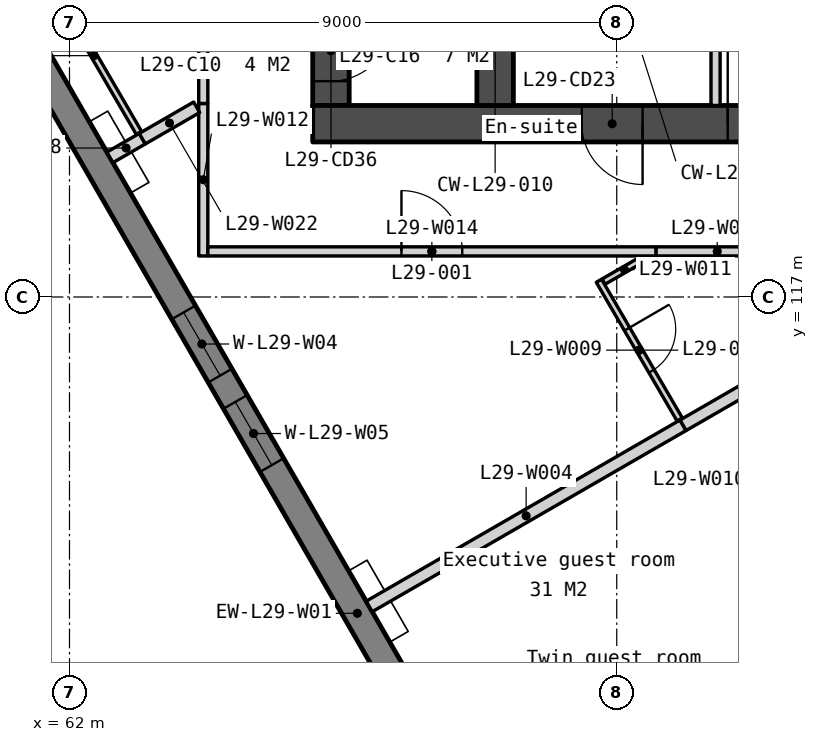
"""IFC4 building model, lengths in metres.
Left out: names, types, materials, properties, quantities, classifications, styles, units other than length and angle.
Written with IfcOpenShell. Run it as: python <this file> out.ifc"""

import sys

from ifc_helpers import new_model, si_unit, direction, frame, frame_2d, origin, place, context, subcontext, project, spatial, polyline, rectangle, outline, extrude, element, fill, save


model = new_model("IFC4")
c1 = context("Model", 3, precision=1e-05, world=origin(), true_north=direction((0.0, 1.0)))
c2 = subcontext(c1, "Body", "Model", "MODEL_VIEW")
j1 = project(units=[si_unit("LENGTHUNIT", "METRE"), si_unit("PLANEANGLEUNIT", "RADIAN")], contexts=[c1])
p1 = place(None, origin())
s1 = spatial("IfcSite", under=j1, at=p1, CompositionType="ELEMENT")
p2 = place(p1, origin())
s2 = spatial("IfcBuilding", under=s1, at=p2, CompositionType="ELEMENT")
p3 = place(p2, frame((0.0, 0.0, 116.8)))
s3 = spatial("IfcBuildingStorey", under=s2, at=p3, CompositionType="ELEMENT", Elevation=116.8)
p4 = place(p3, frame((66.3, 133.95, 0.0), z_axis=(0.0, 0.0, 1.0), x_axis=(0.0, -1.0, 0.0)))
e1 = element("IfcWall", 1, at=p4, inside=s3, PredefinedType="SOLIDWALL", context=c2, shape_type="SweptSolid", body=[
    extrude(rectangle(XDim=13.8, YDim=0.6, at=frame_2d((6.9, 0.0))), origin(), (0.0, 0.0, 1.0), 3.35),
])
p5 = place(p4, frame((0.6, 0.0, 0.0)))
e2 = element("IfcOpeningElement", 2, at=p5, cuts=e1, PredefinedType="OPENING", context=c2, shape_type="SweptSolid", body=[
    extrude(rectangle(XDim=1.1, YDim=2.1, at=frame_2d((0.55, 1.05))), frame((0.0, 0.31, 0.0), z_axis=(0.0, -1.0, 0.0), x_axis=(1.0, 0.0, 0.0)), (0.0, 0.0, 1.0), 0.62),
])
p6 = place(p4, frame((8.405, 0.0, 0.0)))
e3 = element("IfcOpeningElement", 3, at=p6, cuts=e1, PredefinedType="OPENING", context=c2, shape_type="SweptSolid", body=[
    extrude(rectangle(XDim=1.0, YDim=2.1, at=frame_2d((0.5, 1.05))), frame((0.0, 0.31, 0.0), z_axis=(0.0, -1.0, 0.0), x_axis=(1.0, 0.0, 0.0)), (0.0, 0.0, 1.0), 0.62),
])
p7 = place(p4, frame((10.355, 0.0, 0.0)))
e4 = element("IfcOpeningElement", 4, at=p7, cuts=e1, PredefinedType="OPENING", context=c2, shape_type="SweptSolid", body=[
    extrude(rectangle(XDim=1.0, YDim=2.1, at=frame_2d((0.5, 1.05))), frame((0.0, 0.31, 0.0), z_axis=(0.0, -1.0, 0.0), x_axis=(1.0, 0.0, 0.0)), (0.0, 0.0, 1.0), 0.62),
])
p8 = place(p4, frame((12.4, 0.0, 0.0)))
e5 = element("IfcOpeningElement", 5, at=p8, cuts=e1, PredefinedType="OPENING", context=c2, shape_type="SweptSolid", body=[
    extrude(rectangle(XDim=1.0, YDim=2.1, at=frame_2d((0.5, 1.05))), frame((0.0, 0.31, 0.0), z_axis=(0.0, -1.0, 0.0), x_axis=(1.0, 0.0, 0.0)), (0.0, 0.0, 1.0), 0.62),
])
p9 = place(p3, frame((66.0, 119.85, 0.0), z_axis=(0.0, 0.0, 1.0), x_axis=(1.0, 0.0, 0.0)))
e6 = element("IfcWall", 6, at=p9, inside=s3, PredefinedType="SOLIDWALL", context=c2, shape_type="SweptSolid", body=[
    extrude(rectangle(XDim=28.0, YDim=0.6, at=frame_2d((14.0, 0.0))), origin(), (0.0, 0.0, 1.0), 3.35),
])
p10 = place(p9, frame((6.825, 0.0, 0.0)))
e7 = element("IfcOpeningElement", 7, at=p10, cuts=e6, PredefinedType="OPENING", context=c2, shape_type="SweptSolid", body=[
    extrude(rectangle(XDim=1.8, YDim=2.1, at=frame_2d((0.9, 1.05))), frame((0.0, 0.31, 0.0), z_axis=(0.0, -1.0, 0.0), x_axis=(1.0, 0.0, 0.0)), (0.0, 0.0, 1.0), 0.62),
])
p11 = place(p9, frame((15.85, 0.0, 0.0)))
e8 = element("IfcOpeningElement", 8, at=p11, cuts=e6, PredefinedType="OPENING", context=c2, shape_type="SweptSolid", body=[
    extrude(rectangle(XDim=1.5, YDim=2.1, at=frame_2d((0.75, 1.05))), frame((0.0, 0.31, 0.0), z_axis=(0.0, -1.0, 0.0), x_axis=(1.0, 0.0, 0.0)), (0.0, 0.0, 1.0), 0.62),
])
p12 = place(p9, frame((19.375, 0.0, 0.0)))
e9 = element("IfcOpeningElement", 9, at=p12, cuts=e6, PredefinedType="OPENING", context=c2, shape_type="SweptSolid", body=[
    extrude(rectangle(XDim=1.8, YDim=2.1, at=frame_2d((0.9, 1.05))), frame((0.0, 0.31, 0.0), z_axis=(0.0, -1.0, 0.0), x_axis=(1.0, 0.0, 0.0)), (0.0, 0.0, 1.0), 0.62),
])
p13 = place(p9, frame((4.425, 0.0, 0.0)))
e10 = element("IfcOpeningElement", 10, at=p13, cuts=e6, PredefinedType="OPENING", context=c2, shape_type="SweptSolid", body=[
    extrude(rectangle(XDim=1.0, YDim=2.1, at=frame_2d((0.5, 1.05))), frame((0.0, 0.31, 0.0), z_axis=(0.0, -1.0, 0.0), x_axis=(1.0, 0.0, 0.0)), (0.0, 0.0, 1.0), 0.62),
])
p14 = place(p9, frame((9.783, 0.0, 0.0)))
e11 = element("IfcOpeningElement", 11, at=p14, cuts=e6, PredefinedType="OPENING", context=c2, shape_type="SweptSolid", body=[
    extrude(rectangle(XDim=1.0, YDim=2.1, at=frame_2d((0.5, 1.05))), frame((0.0, 0.31, 0.0), z_axis=(0.0, -1.0, 0.0), x_axis=(1.0, 0.0, 0.0)), (0.0, 0.0, 1.0), 0.62),
])
p15 = place(p9, frame((11.525, 0.0, 0.0)))
e12 = element("IfcOpeningElement", 12, at=p15, cuts=e6, PredefinedType="OPENING", context=c2, shape_type="SweptSolid", body=[
    extrude(rectangle(XDim=1.0, YDim=2.1, at=frame_2d((0.5, 1.05))), frame((0.0, 0.31, 0.0), z_axis=(0.0, -1.0, 0.0), x_axis=(1.0, 0.0, 0.0)), (0.0, 0.0, 1.0), 0.62),
])
p16 = place(p9, frame((13.658, 0.0, 0.0)))
e13 = element("IfcOpeningElement", 13, at=p16, cuts=e6, PredefinedType="OPENING", context=c2, shape_type="SweptSolid", body=[
    extrude(rectangle(XDim=1.0, YDim=2.1, at=frame_2d((0.5, 1.05))), frame((0.0, 0.31, 0.0), z_axis=(0.0, -1.0, 0.0), x_axis=(1.0, 0.0, 0.0)), (0.0, 0.0, 1.0), 0.62),
])
p17 = place(p9, frame((21.725, 0.0, 0.0)))
e14 = element("IfcOpeningElement", 14, at=p17, cuts=e6, PredefinedType="OPENING", context=c2, shape_type="SweptSolid", body=[
    extrude(rectangle(XDim=1.0, YDim=2.1, at=frame_2d((0.5, 1.05))), frame((0.0, 0.31, 0.0), z_axis=(0.0, -1.0, 0.0), x_axis=(1.0, 0.0, 0.0)), (0.0, 0.0, 1.0), 0.62),
])
p18 = place(p9, frame((23.425, 0.0, 0.0)))
e15 = element("IfcOpeningElement", 15, at=p18, cuts=e6, PredefinedType="OPENING", context=c2, shape_type="SweptSolid", body=[
    extrude(rectangle(XDim=1.0, YDim=2.1, at=frame_2d((0.5, 1.05))), frame((0.0, 0.31, 0.0), z_axis=(0.0, -1.0, 0.0), x_axis=(1.0, 0.0, 0.0)), (0.0, 0.0, 1.0), 0.62),
])
p19 = place(p3, frame((69.0, 122.25, 0.0), z_axis=(0.0, 0.0, 1.0), x_axis=(0.0, -1.0, 0.0)))
e16 = element("IfcWall", 16, at=p19, inside=s3, PredefinedType="SOLIDWALL", context=c2, shape_type="SweptSolid", body=[
    extrude(rectangle(XDim=2.1, YDim=0.6, at=frame_2d((1.05, 0.0))), origin(), (0.0, 0.0, 1.0), 3.35),
])
p20 = place(p3, frame((72.625, 122.25, 0.0), z_axis=(0.0, 0.0, 1.0), x_axis=(0.0, -1.0, 0.0)))
e17 = element("IfcWall", 17, at=p20, inside=s3, PredefinedType="PARTITIONING", context=c2, shape_type="SweptSolid", body=[
    extrude(rectangle(XDim=2.1, YDim=0.15, at=frame_2d((1.05, 0.0))), origin(), (0.0, 0.0, 1.0), 3.35),
])
p21 = place(p3, frame((56.073, 130.263, -0.15), z_axis=(0.0, 0.0, 1.0), x_axis=(0.500000478905, -0.866025127289, 0.0)))
e18 = element("IfcWall", 18, at=p21, inside=s3, PredefinedType="SOLIDWALL", context=c2, shape_type="SweptSolid", body=[
    extrude(outline(polyline([(42.643, 0.0), (42.643, 3.5), (0.0, 3.5), (0.0, 0.0), (42.643, 0.0)])), frame((0.0, 0.225, 0.0), z_axis=(0.0, -1.0, 0.0), x_axis=(1.0, 0.0, 0.0)), (0.0, 0.0, 1.0), 0.45),
])
p22 = place(p21, frame((0.72, 0.0, 1.05)))
e19 = element("IfcOpeningElement", 19, at=p22, cuts=e18, PredefinedType="OPENING", context=c2, shape_type="SweptSolid", body=[
    extrude(rectangle(XDim=1.2, YDim=1.5, at=frame_2d((0.6, 0.75))), frame((0.0, 0.235, 0.0), z_axis=(0.0, -1.0, 0.0), x_axis=(1.0, 0.0, 0.0)), (0.0, 0.0, 1.0), 0.47),
])
p23 = place(p21, frame((7.079, 0.0, 1.05)))
e20 = element("IfcOpeningElement", 20, at=p23, cuts=e18, PredefinedType="OPENING", context=c2, shape_type="SweptSolid", body=[
    extrude(rectangle(XDim=1.2, YDim=1.5, at=frame_2d((0.6, 0.75))), frame((0.0, 0.235, 0.0), z_axis=(0.0, -1.0, 0.0), x_axis=(1.0, 0.0, 0.0)), (0.0, 0.0, 1.0), 0.47),
])
p24 = place(p21, frame((8.779, 0.0, 1.05)))
e21 = element("IfcOpeningElement", 21, at=p24, cuts=e18, PredefinedType="OPENING", context=c2, shape_type="SweptSolid", body=[
    extrude(rectangle(XDim=1.2, YDim=1.5, at=frame_2d((0.6, 0.75))), frame((0.0, 0.235, 0.0), z_axis=(0.0, -1.0, 0.0), x_axis=(1.0, 0.0, 0.0)), (0.0, 0.0, 1.0), 0.47),
])
p25 = place(p21, frame((15.607, 0.0, 1.05)))
e22 = element("IfcOpeningElement", 22, at=p25, cuts=e18, PredefinedType="OPENING", context=c2, shape_type="SweptSolid", body=[
    extrude(rectangle(XDim=1.2, YDim=1.5, at=frame_2d((0.6, 0.75))), frame((0.0, 0.235, 0.0), z_axis=(0.0, -1.0, 0.0), x_axis=(1.0, 0.0, 0.0)), (0.0, 0.0, 1.0), 0.47),
])
p26 = place(p21, frame((17.307, 0.0, 1.05)))
e23 = element("IfcOpeningElement", 23, at=p26, cuts=e18, PredefinedType="OPENING", context=c2, shape_type="SweptSolid", body=[
    extrude(rectangle(XDim=1.2, YDim=1.5, at=frame_2d((0.6, 0.75))), frame((0.0, 0.235, 0.0), z_axis=(0.0, -1.0, 0.0), x_axis=(1.0, 0.0, 0.0)), (0.0, 0.0, 1.0), 0.47),
])
p27 = place(p21, frame((24.136, 0.0, 1.05)))
e24 = element("IfcOpeningElement", 24, at=p27, cuts=e18, PredefinedType="OPENING", context=c2, shape_type="SweptSolid", body=[
    extrude(rectangle(XDim=1.2, YDim=1.5, at=frame_2d((0.6, 0.75))), frame((0.0, 0.235, 0.0), z_axis=(0.0, -1.0, 0.0), x_axis=(1.0, 0.0, 0.0)), (0.0, 0.0, 1.0), 0.47),
])
p28 = place(p21, frame((25.836, 0.0, 1.05)))
e25 = element("IfcOpeningElement", 25, at=p28, cuts=e18, PredefinedType="OPENING", context=c2, shape_type="SweptSolid", body=[
    extrude(rectangle(XDim=1.2, YDim=1.5, at=frame_2d((0.6, 0.75))), frame((0.0, 0.235, 0.0), z_axis=(0.0, -1.0, 0.0), x_axis=(1.0, 0.0, 0.0)), (0.0, 0.0, 1.0), 0.47),
])
p29 = place(p21, frame((32.665, 0.0, 1.05)))
e26 = element("IfcOpeningElement", 26, at=p29, cuts=e18, PredefinedType="OPENING", context=c2, shape_type="SweptSolid", body=[
    extrude(rectangle(XDim=1.2, YDim=1.5, at=frame_2d((0.6, 0.75))), frame((0.0, 0.235, 0.0), z_axis=(0.0, -1.0, 0.0), x_axis=(1.0, 0.0, 0.0)), (0.0, 0.0, 1.0), 0.47),
])
p30 = place(p21, frame((34.365, 0.0, 1.05)))
e27 = element("IfcOpeningElement", 27, at=p30, cuts=e18, PredefinedType="OPENING", context=c2, shape_type="SweptSolid", body=[
    extrude(rectangle(XDim=1.2, YDim=1.5, at=frame_2d((0.6, 0.75))), frame((0.0, 0.235, 0.0), z_axis=(0.0, -1.0, 0.0), x_axis=(1.0, 0.0, 0.0)), (0.0, 0.0, 1.0), 0.47),
])
p31 = place(p21, frame((40.722, 0.0, 1.05)))
e28 = element("IfcOpeningElement", 28, at=p31, cuts=e18, PredefinedType="OPENING", context=c2, shape_type="SweptSolid", body=[
    extrude(rectangle(XDim=1.2, YDim=1.5, at=frame_2d((0.6, 0.75))), frame((0.0, 0.235, 0.0), z_axis=(0.0, -1.0, 0.0), x_axis=(1.0, 0.0, 0.0)), (0.0, 0.0, 1.0), 0.47),
])
p32 = place(p3, frame((69.061, 108.217, 0.0), z_axis=(0.0, 0.0, 1.0), x_axis=(0.866019924591, 0.500009490121, 0.0)))
e29 = element("IfcWall", 29, at=p32, inside=s3, PredefinedType="PARTITIONING", context=c2, shape_type="SweptSolid", body=[
    extrude(rectangle(XDim=6.16, YDim=0.2, at=frame_2d((3.08, 0.0))), origin(), (0.0, 0.0, 1.0), 3.35),
])
p33 = place(p3, frame((66.929, 111.91, 0.0), z_axis=(0.0, 0.0, 1.0), x_axis=(0.866003444533, 0.50003803261, 0.0)))
e30 = element("IfcWall", 30, at=p33, inside=s3, PredefinedType="PARTITIONING", context=c2, shape_type="SweptSolid", body=[
    extrude(rectangle(XDim=5.96, YDim=0.2, at=frame_2d((2.98, 0.0))), origin(), (0.0, 0.0, 1.0), 3.35),
])
p34 = place(p3, frame((70.707, 117.267, 0.0), z_axis=(0.0, 0.0, 1.0), x_axis=(0.503232687374, -0.864150948827, 0.0)))
e31 = element("IfcWall", 31, at=p34, inside=s3, PredefinedType="PARTITIONING", context=c2, shape_type="SweptSolid", body=[
    extrude(rectangle(XDim=2.64, YDim=0.1, at=frame_2d((1.32, 0.0))), origin(), (0.0, 0.0, 1.0), 3.35),
])
p35 = place(p34, frame((0.92, 0.0, 0.0)))
e32 = element("IfcOpeningElement", 32, at=p35, cuts=e31, PredefinedType="OPENING", context=c2, shape_type="SweptSolid", body=[
    extrude(rectangle(XDim=0.8, YDim=2.1, at=frame_2d((0.4, 1.05))), frame((0.0, 0.06, 0.0), z_axis=(0.0, -1.0, 0.0), x_axis=(1.0, 0.0, 0.0)), (0.0, 0.0, 1.0), 0.12),
])
p36 = place(p3, frame((72.09, 114.89, 0.0), z_axis=(0.0, 0.0, 1.0), x_axis=(0.866074375271, 0.499915169302, 0.0)))
e33 = element("IfcWall", 33, at=p36, inside=s3, PredefinedType="PARTITIONING", context=c2, shape_type="SweptSolid", body=[
    extrude(rectangle(XDim=2.705, YDim=0.2, at=frame_2d((1.353, 0.0))), origin(), (0.0, 0.0, 1.0), 3.35),
])
p37 = place(p3, frame((70.784, 117.253, 0.0), z_axis=(0.0, 0.0, 1.0), x_axis=(0.865984347675, 0.500071104525, 0.0)))
e34 = element("IfcWall", 34, at=p37, inside=s3, PredefinedType="PARTITIONING", context=c2, shape_type="SweptSolid", body=[
    extrude(rectangle(XDim=0.788, YDim=0.1, at=frame_2d((0.394, 0.0))), origin(), (0.0, 0.0, 1.0), 3.35),
])
p38 = place(p3, frame((64.2, 117.675, 0.0), z_axis=(0.0, 0.0, 1.0), x_axis=(0.0, 1.0, 0.0)))
e35 = element("IfcWall", 35, at=p38, inside=s3, PredefinedType="PARTITIONING", context=c2, shape_type="SweptSolid", body=[
    extrude(rectangle(XDim=2.508, YDim=0.15, at=frame_2d((1.254, 0.0))), origin(), (0.0, 0.0, 1.0), 3.35),
])
p39 = place(p3, frame((71.644, 117.75, 0.0), z_axis=(0.0, 0.0, 1.0), x_axis=(1.0, 0.0, 0.0)))
e36 = element("IfcWall", 36, at=p39, inside=s3, PredefinedType="PARTITIONING", context=c2, shape_type="SweptSolid", body=[
    extrude(rectangle(XDim=2.017, YDim=0.15, at=frame_2d((1.009, 0.0))), origin(), (0.0, 0.0, 1.0), 3.35),
])
p40 = place(p3, frame((64.275, 117.75, 0.0), z_axis=(0.0, 0.0, 1.0), x_axis=(1.0, 0.0, 0.0)))
e37 = element("IfcWall", 37, at=p40, inside=s3, PredefinedType="PARTITIONING", context=c2, shape_type="SweptSolid", body=[
    extrude(rectangle(XDim=7.369, YDim=0.15, at=frame_2d((3.684, 0.0))), origin(), (0.0, 0.0, 1.0), 3.35),
])
p41 = place(p40, frame((3.184, 0.0, 0.0)))
e38 = element("IfcOpeningElement", 38, at=p41, cuts=e37, PredefinedType="OPENING", context=c2, shape_type="SweptSolid", body=[
    extrude(rectangle(XDim=1.0, YDim=2.1, at=frame_2d((0.5, 1.05))), frame((0.0, 0.085, 0.0), z_axis=(0.0, -1.0, 0.0), x_axis=(1.0, 0.0, 0.0)), (0.0, 0.0, 1.0), 0.17),
])
p42 = place(p3, frame((62.665, 119.296, 0.0), z_axis=(0.0, 0.0, 1.0), x_axis=(0.865987299264, 0.500065993159, 0.0)))
e39 = element("IfcWall", 39, at=p42, inside=s3, PredefinedType="PARTITIONING", context=c2, shape_type="SweptSolid", body=[
    extrude(rectangle(XDim=0.615, YDim=0.2, at=frame_2d((0.308, 0.0))), origin(), (0.0, 0.0, 1.0), 3.35),
])
p43 = place(p3, frame((61.663, 122.24, 0.0), z_axis=(0.0, 0.0, 1.0), x_axis=(0.502884554521, -0.864353587847, 0.0)))
e40 = element("IfcWall", 40, at=p43, inside=s3, PredefinedType="PARTITIONING", context=c2, shape_type="SweptSolid", body=[
    extrude(rectangle(XDim=2.94, YDim=0.1, at=frame_2d((1.47, 0.0))), origin(), (0.0, 0.0, 1.0), 3.35),
])
p44 = place(p3, frame((63.197, 119.604, 0.0), z_axis=(0.0, 0.0, 1.0), x_axis=(0.866067506982, 0.499927068031, 0.0)))
e41 = element("IfcWall", 41, at=p44, inside=s3, PredefinedType="PARTITIONING", context=c2, shape_type="SweptSolid", body=[
    extrude(rectangle(XDim=1.033, YDim=0.2, at=frame_2d((0.517, 0.0))), origin(), (0.0, 0.0, 1.0), 3.35),
])
p45 = place(p3, frame((64.2, 120.183, 0.0), z_axis=(0.0, 0.0, 1.0), x_axis=(0.0, 1.0, 0.0)))
e42 = element("IfcWall", 42, at=p45, inside=s3, PredefinedType="PARTITIONING", context=c2, shape_type="SweptSolid", body=[
    extrude(rectangle(XDim=3.464, YDim=0.15, at=frame_2d((1.732, 0.0))), origin(), (0.0, 0.0, 1.0), 3.35),
])
p46 = place(p10, origin())
e43 = element("IfcDoor", 43, at=p46, inside=s3, OperationType="DOUBLE_DOOR_DOUBLE_SWING", PredefinedType="DOOR", context=c2, shape_type="SweptSolid", body=[
    extrude(rectangle(XDim=1.8, YDim=2.1, at=frame_2d((0.9, 1.05))), frame((0.0, 0.025, 0.0), z_axis=(0.0, -1.0, 0.0), x_axis=(1.0, 0.0, 0.0)), (0.0, 0.0, 1.0), 0.05),
])
fill(e7, e43)
p47 = place(p13, origin())
e44 = element("IfcDoor", 44, at=p47, inside=s3, OperationType="SINGLE_SWING_RIGHT", PredefinedType="DOOR", context=c2, shape_type="SweptSolid", body=[
    extrude(rectangle(XDim=1.0, YDim=2.1, at=frame_2d((0.5, 1.05))), frame((0.0, 0.025, 0.0), z_axis=(0.0, -1.0, 0.0), x_axis=(1.0, 0.0, 0.0)), (0.0, 0.0, 1.0), 0.05),
])
fill(e10, e44)
p48 = place(p8, origin())
e45 = element("IfcDoor", 45, at=p48, inside=s3, OperationType="SINGLE_SWING_LEFT", PredefinedType="DOOR", context=c2, shape_type="SweptSolid", body=[
    extrude(rectangle(XDim=1.0, YDim=2.1, at=frame_2d((0.5, 1.05))), frame((0.0, 0.025, 0.0), z_axis=(0.0, -1.0, 0.0), x_axis=(1.0, 0.0, 0.0)), (0.0, 0.0, 1.0), 0.05),
])
fill(e5, e45)
p49 = place(p25, origin())
e46 = element("IfcWindow", 46, at=p49, inside=s3, PartitioningType="SINGLE_PANEL", PredefinedType="WINDOW", context=c2, shape_type="SweptSolid", body=[
    extrude(rectangle(XDim=1.2, YDim=1.5, at=frame_2d((0.6, 0.75))), frame((0.0, 0.03, 0.0), z_axis=(0.0, -1.0, 0.0), x_axis=(1.0, 0.0, 0.0)), (0.0, 0.0, 1.0), 0.06),
])
fill(e22, e46)
p50 = place(p26, origin())
e47 = element("IfcWindow", 47, at=p50, inside=s3, PartitioningType="SINGLE_PANEL", PredefinedType="WINDOW", context=c2, shape_type="SweptSolid", body=[
    extrude(rectangle(XDim=1.2, YDim=1.5, at=frame_2d((0.6, 0.75))), frame((0.0, 0.03, 0.0), z_axis=(0.0, -1.0, 0.0), x_axis=(1.0, 0.0, 0.0)), (0.0, 0.0, 1.0), 0.06),
])
fill(e23, e47)
p51 = place(p41, origin())
e48 = element("IfcDoor", 48, at=p51, inside=s3, OperationType="SINGLE_SWING_LEFT", PredefinedType="DOOR", context=c2, shape_type="SweptSolid", body=[
    extrude(rectangle(XDim=1.0, YDim=2.1, at=frame_2d((0.5, 1.05))), frame((0.0, 0.025, 0.0), z_axis=(0.0, -1.0, 0.0), x_axis=(1.0, 0.0, 0.0)), (0.0, 0.0, 1.0), 0.05),
])
fill(e38, e48)
p52 = place(p35, origin())
e49 = element("IfcDoor", 49, at=p52, inside=s3, OperationType="SINGLE_SWING_LEFT", PredefinedType="DOOR", context=c2, shape_type="SweptSolid", body=[
    extrude(rectangle(XDim=0.8, YDim=2.1, at=frame_2d((0.4, 1.05))), frame((0.0, 0.025, 0.0), z_axis=(0.0, -1.0, 0.0), x_axis=(1.0, 0.0, 0.0)), (0.0, 0.0, 1.0), 0.05),
])
fill(e32, e49)
save(model, sys.argv[1])
